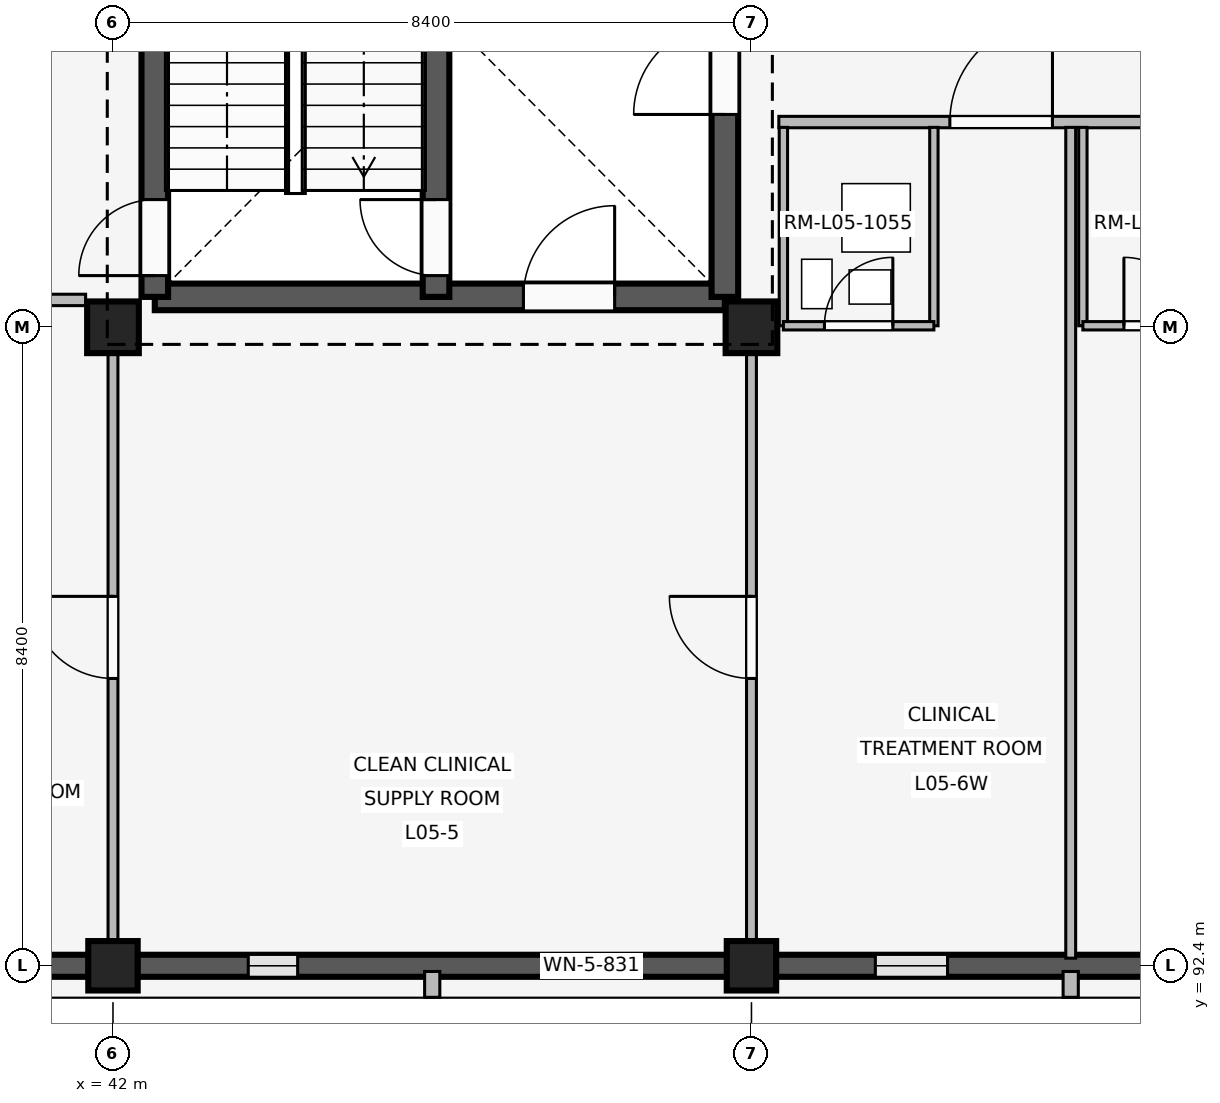
"""IFC4 building model, lengths in metres.
Left out: names, types, materials, properties, quantities, classifications, styles, units other than length and angle.
Written with IfcOpenShell. Run it as: python <this file> out.ifc"""

import sys

from ifc_helpers import new_model, si_unit, direction, frame, frame_2d, origin, origin_2d, place, context, subcontext, project, spatial, rectangle, extrude, element, fill, save


model = new_model("IFC4")
c1 = context("Model", 3, precision=1e-05, world=origin(), true_north=direction((0.0, 1.0)))
c2 = subcontext(c1, "Body", "Model", "MODEL_VIEW")
j1 = project(units=[si_unit("LENGTHUNIT", "METRE"), si_unit("PLANEANGLEUNIT", "RADIAN")], contexts=[c1])
p1 = place(None, origin())
s1 = spatial("IfcSite", under=j1, at=p1, CompositionType="ELEMENT")
p2 = place(p1, origin())
s2 = spatial("IfcBuilding", under=s1, at=p2, CompositionType="ELEMENT")
p3 = place(p2, frame((0.0, 0.0, 20.4)))
s3 = spatial("IfcBuildingStorey", under=s2, at=p3, CompositionType="ELEMENT", Elevation=20.4)
p4 = place(p3, frame((42.0, 92.4, 0.0), z_axis=(0.0, 0.0, 1.0), x_axis=(1.0, 0.0, 0.0)))
e1 = element("IfcColumn", 1, at=p4, inside=s3, PredefinedType="COLUMN", context=c2, shape_type="SweptSolid", body=[
    extrude(rectangle(XDim=0.65, YDim=0.65, at=origin_2d()), origin(), (0.0, 0.0, 1.0), 4.2),
])
p5 = place(p3, frame((42.0, 100.8, 0.0), z_axis=(0.0, 0.0, 1.0), x_axis=(1.0, 0.0, 0.0)))
e2 = element("IfcColumn", 2, at=p5, inside=s3, PredefinedType="COLUMN", context=c2, shape_type="SweptSolid", body=[
    extrude(rectangle(XDim=0.68, YDim=0.68, at=origin_2d()), origin(), (0.0, 0.0, 1.0), 4.2),
])
p6 = place(p3, frame((50.4, 92.4, 0.0), z_axis=(0.0, 0.0, 1.0), x_axis=(1.0, 0.0, 0.0)))
e3 = element("IfcColumn", 3, at=p6, inside=s3, PredefinedType="COLUMN", context=c2, shape_type="SweptSolid", body=[
    extrude(rectangle(XDim=0.65, YDim=0.65, at=origin_2d()), origin(), (0.0, 0.0, 1.0), 4.2),
])
p7 = place(p3, frame((50.4, 100.8, 0.0), z_axis=(0.0, 0.0, 1.0), x_axis=(1.0, 0.0, 0.0)))
e4 = element("IfcColumn", 4, at=p7, inside=s3, PredefinedType="COLUMN", context=c2, shape_type="SweptSolid", body=[
    extrude(rectangle(XDim=0.68, YDim=0.68, at=origin_2d()), origin(), (0.0, 0.0, 1.0), 4.2),
])
p8 = place(p3, frame((41.68, 92.4, 0.0), z_axis=(0.0, 0.0, 1.0), x_axis=(-1.0, 0.0, 0.0)))
e5 = element("IfcWall", 5, at=p8, inside=s3, PredefinedType="SOLIDWALL", context=c2, shape_type="SweptSolid", body=[
    extrude(rectangle(XDim=7.76, YDim=0.29, at=frame_2d((3.88, 0.0))), origin(), (0.0, 0.0, 1.0), 3.34),
])
p9 = place(p8, frame((1.225, 0.0, 0.85)))
e6 = element("IfcOpeningElement", 6, at=p9, cuts=e5, PredefinedType="OPENING", context=c2, shape_type="SweptSolid", body=[
    extrude(rectangle(XDim=0.75, YDim=1.85, at=frame_2d((0.375, 0.925))), frame((0.0, 0.155, 0.0), z_axis=(0.0, -1.0, 0.0), x_axis=(1.0, 0.0, 0.0)), (0.0, 0.0, 1.0), 0.31),
])
p10 = place(p8, frame((5.6, 0.0, 0.85)))
e7 = element("IfcOpeningElement", 7, at=p10, cuts=e5, PredefinedType="OPENING", context=c2, shape_type="SweptSolid", body=[
    extrude(rectangle(XDim=0.75, YDim=1.85, at=frame_2d((0.375, 0.925))), frame((0.0, 0.155, 0.0), z_axis=(0.0, -1.0, 0.0), x_axis=(1.0, 0.0, 0.0)), (0.0, 0.0, 1.0), 0.31),
])
p11 = place(p3, frame((50.08, 92.4, 0.0), z_axis=(0.0, 0.0, 1.0), x_axis=(-1.0, 0.0, 0.0)))
e8 = element("IfcWall", 8, at=p11, inside=s3, PredefinedType="SOLIDWALL", context=c2, shape_type="SweptSolid", body=[
    extrude(rectangle(XDim=7.76, YDim=0.29, at=frame_2d((3.88, 0.0))), origin(), (0.0, 0.0, 1.0), 3.34),
])
p12 = place(p11, frame((1.46, 0.0, 0.85)))
e9 = element("IfcOpeningElement", 9, at=p12, cuts=e8, PredefinedType="OPENING", context=c2, shape_type="SweptSolid", body=[
    extrude(rectangle(XDim=0.65, YDim=1.75, at=frame_2d((0.325, 0.875))), frame((0.0, 0.155, 0.0), z_axis=(0.0, -1.0, 0.0), x_axis=(1.0, 0.0, 0.0)), (0.0, 0.0, 1.0), 0.31),
])
p13 = place(p11, frame((5.65, 0.0, 0.85)))
e10 = element("IfcOpeningElement", 10, at=p13, cuts=e8, PredefinedType="OPENING", context=c2, shape_type="SweptSolid", body=[
    extrude(rectangle(XDim=0.65, YDim=1.75, at=frame_2d((0.325, 0.875))), frame((0.0, 0.155, 0.0), z_axis=(0.0, -1.0, 0.0), x_axis=(1.0, 0.0, 0.0)), (0.0, 0.0, 1.0), 0.31),
])
p14 = place(p3, frame((46.2, 92.325, 0.0), z_axis=(0.0, 0.0, 1.0), x_axis=(0.0, -1.0, 0.0)))
e11 = element("IfcWall", 11, at=p14, inside=s3, PredefinedType="ELEMENTEDWALL", context=c2, shape_type="SweptSolid", body=[
    extrude(rectangle(XDim=0.34, YDim=0.2, at=frame_2d((0.17, 0.0))), origin(), (0.0, 0.0, 1.0), 3.32),
])
p15 = place(p3, frame((58.48, 92.4, 0.0), z_axis=(0.0, 0.0, 1.0), x_axis=(-1.0, 0.0, 0.0)))
e12 = element("IfcWall", 12, at=p15, inside=s3, PredefinedType="SOLIDWALL", context=c2, shape_type="SweptSolid", body=[
    extrude(rectangle(XDim=7.76, YDim=0.29, at=frame_2d((3.88, 0.0))), origin(), (0.0, 0.0, 1.0), 3.34),
])
p16 = place(p15, frame((1.31, 0.0, 0.85)))
e13 = element("IfcOpeningElement", 13, at=p16, cuts=e12, PredefinedType="OPENING", context=c2, shape_type="SweptSolid", body=[
    extrude(rectangle(XDim=0.95, YDim=1.6, at=frame_2d((0.475, 0.8))), frame((0.0, 0.155, 0.0), z_axis=(0.0, -1.0, 0.0), x_axis=(1.0, 0.0, 0.0)), (0.0, 0.0, 1.0), 0.31),
])
p17 = place(p15, frame((5.5, 0.0, 0.85)))
e14 = element("IfcOpeningElement", 14, at=p17, cuts=e12, PredefinedType="OPENING", context=c2, shape_type="SweptSolid", body=[
    extrude(rectangle(XDim=0.95, YDim=1.6, at=frame_2d((0.475, 0.8))), frame((0.0, 0.155, 0.0), z_axis=(0.0, -1.0, 0.0), x_axis=(1.0, 0.0, 0.0)), (0.0, 0.0, 1.0), 0.31),
])
p18 = place(p3, frame((54.6, 92.325, 0.0), z_axis=(0.0, 0.0, 1.0), x_axis=(0.0, -1.0, 0.0)))
e15 = element("IfcWall", 15, at=p18, inside=s3, PredefinedType="ELEMENTEDWALL", context=c2, shape_type="SweptSolid", body=[
    extrude(rectangle(XDim=0.34, YDim=0.2, at=frame_2d((0.17, 0.0))), origin(), (0.0, 0.0, 1.0), 3.32),
])
p19 = place(p3, frame((42.55, 101.2, 0.0), z_axis=(0.0, 0.0, 1.0), x_axis=(1.0, 0.0, 0.0)))
e16 = element("IfcWall", 16, at=p19, inside=s3, PredefinedType="SHEAR", context=c2, shape_type="SweptSolid", body=[
    extrude(rectangle(XDim=7.5, YDim=0.35, at=frame_2d((3.75, 0.0))), origin(), (0.0, 0.0, 1.0), 3.92),
])
p20 = place(p19, frame((4.85, 0.0, 0.0)))
e17 = element("IfcOpeningElement", 17, at=p20, cuts=e16, PredefinedType="OPENING", context=c2, shape_type="SweptSolid", body=[
    extrude(rectangle(XDim=1.2, YDim=2.2, at=frame_2d((0.6, 1.1))), frame((0.0, 0.185, 0.0), z_axis=(0.0, -1.0, 0.0), x_axis=(1.0, 0.0, 0.0)), (0.0, 0.0, 1.0), 0.37),
])
p21 = place(p3, frame((42.55, 101.2, 0.0), z_axis=(0.0, 0.0, 1.0), x_axis=(0.0, 1.0, 0.0)))
e18 = element("IfcWall", 18, at=p21, inside=s3, PredefinedType="SHEAR", context=c2, shape_type="SweptSolid", body=[
    extrude(rectangle(XDim=7.55, YDim=0.35, at=frame_2d((3.775, 0.0))), origin(), (0.0, 0.0, 1.0), 3.92),
])
p22 = place(p21, frame((0.28, 0.0, 0.0)))
e19 = element("IfcOpeningElement", 19, at=p22, cuts=e18, PredefinedType="OPENING", context=c2, shape_type="SweptSolid", body=[
    extrude(rectangle(XDim=1.0, YDim=2.15, at=frame_2d((0.5, 1.075))), frame((0.0, 0.185, 0.0), z_axis=(0.0, -1.0, 0.0), x_axis=(1.0, 0.0, 0.0)), (0.0, 0.0, 1.0), 0.37),
])
p23 = place(p3, frame((50.05, 101.2, 0.0), z_axis=(0.0, 0.0, 1.0), x_axis=(0.0, 1.0, 0.0)))
e20 = element("IfcWall", 20, at=p23, inside=s3, PredefinedType="SHEAR", context=c2, shape_type="SweptSolid", body=[
    extrude(rectangle(XDim=7.55, YDim=0.35, at=frame_2d((3.775, 0.0))), origin(), (0.0, 0.0, 1.0), 3.92),
])
p24 = place(p23, frame((2.4, 0.0, 0.0)))
e21 = element("IfcOpeningElement", 21, at=p24, cuts=e20, PredefinedType="OPENING", context=c2, shape_type="SweptSolid", body=[
    extrude(rectangle(XDim=1.2, YDim=2.2, at=frame_2d((0.6, 1.1))), frame((0.0, 0.185, 0.0), z_axis=(0.0, -1.0, 0.0), x_axis=(1.0, 0.0, 0.0)), (0.0, 0.0, 1.0), 0.37),
])
p25 = place(p3, frame((46.25, 101.2, 0.0), z_axis=(0.0, 0.0, 1.0), x_axis=(0.0, 1.0, 0.0)))
e22 = element("IfcWall", 22, at=p25, inside=s3, PredefinedType="SHEAR", context=c2, shape_type="SweptSolid", body=[
    extrude(rectangle(XDim=7.55, YDim=0.35, at=frame_2d((3.775, 0.0))), origin(), (0.0, 0.0, 1.0), 3.92),
])
p26 = place(p25, frame((0.28, 0.0, 0.0)))
e23 = element("IfcOpeningElement", 23, at=p26, cuts=e22, PredefinedType="OPENING", context=c2, shape_type="SweptSolid", body=[
    extrude(rectangle(XDim=1.0, YDim=2.15, at=frame_2d((0.5, 1.075))), frame((0.0, 0.185, 0.0), z_axis=(0.0, -1.0, 0.0), x_axis=(1.0, 0.0, 0.0)), (0.0, 0.0, 1.0), 0.37),
])
p27 = place(p3, frame((39.46, 101.16, 0.0), z_axis=(0.0, 0.0, 1.0), x_axis=(1.0, 0.0, 0.0)))
e24 = element("IfcWall", 24, at=p27, inside=s3, PredefinedType="PARTITIONING", context=c2, shape_type="SweptSolid", body=[
    extrude(rectangle(XDim=2.18, YDim=0.15, at=frame_2d((1.09, 0.0))), origin(), (0.0, 0.0, 1.0), 3.32),
])
p28 = place(p27, frame((0.5, 0.0, 0.0)))
e25 = element("IfcOpeningElement", 25, at=p28, cuts=e24, PredefinedType="OPENING", context=c2, shape_type="SweptSolid", body=[
    extrude(rectangle(XDim=1.08, YDim=2.15, at=frame_2d((0.54, 1.075))), frame((0.0, 0.085, 0.0), z_axis=(0.0, -1.0, 0.0), x_axis=(1.0, 0.0, 0.0)), (0.0, 0.0, 1.0), 0.17),
])
p29 = place(p3, frame((42.0, 92.54, 0.0), z_axis=(0.0, 0.0, 1.0), x_axis=(0.0, 1.0, 0.0)))
e26 = element("IfcWall", 26, at=p29, inside=s3, PredefinedType="PARTITIONING", context=c2, shape_type="SweptSolid", body=[
    extrude(rectangle(XDim=8.21, YDim=0.13, at=frame_2d((4.105, 0.0))), origin(), (0.0, 0.0, 1.0), 3.32),
])
p30 = place(p29, frame((3.64, 0.0, 0.0)))
e27 = element("IfcOpeningElement", 27, at=p30, cuts=e26, PredefinedType="OPENING", context=c2, shape_type="SweptSolid", body=[
    extrude(rectangle(XDim=1.08, YDim=2.15, at=frame_2d((0.54, 1.075))), frame((0.0, 0.075, 0.0), z_axis=(0.0, -1.0, 0.0), x_axis=(1.0, 0.0, 0.0)), (0.0, 0.0, 1.0), 0.15),
])
p31 = place(p3, frame((50.4, 92.54, 0.0), z_axis=(0.0, 0.0, 1.0), x_axis=(0.0, 1.0, 0.0)))
e28 = element("IfcWall", 28, at=p31, inside=s3, PredefinedType="PARTITIONING", context=c2, shape_type="SweptSolid", body=[
    extrude(rectangle(XDim=8.21, YDim=0.13, at=frame_2d((4.105, 0.0))), origin(), (0.0, 0.0, 1.0), 3.32),
])
p32 = place(p31, frame((3.64, 0.0, 0.0)))
e29 = element("IfcOpeningElement", 29, at=p32, cuts=e28, PredefinedType="OPENING", context=c2, shape_type="SweptSolid", body=[
    extrude(rectangle(XDim=1.08, YDim=2.15, at=frame_2d((0.54, 1.075))), frame((0.0, 0.075, 0.0), z_axis=(0.0, -1.0, 0.0), x_axis=(1.0, 0.0, 0.0)), (0.0, 0.0, 1.0), 0.15),
])
p33 = place(p3, frame((50.76, 103.5, 0.0), z_axis=(0.0, 0.0, 1.0), x_axis=(1.0, 0.0, 0.0)))
e30 = element("IfcWall", 30, at=p33, inside=s3, PredefinedType="PARTITIONING", context=c2, shape_type="SweptSolid", body=[
    extrude(rectangle(XDim=7.96, YDim=0.15, at=frame_2d((3.98, 0.0))), origin(), (0.0, 0.0, 1.0), 3.32),
])
p34 = place(p33, frame((2.25, 0.0, 0.0)))
e31 = element("IfcOpeningElement", 31, at=p34, cuts=e30, PredefinedType="OPENING", context=c2, shape_type="SweptSolid", body=[
    extrude(rectangle(XDim=1.35, YDim=2.25, at=frame_2d((0.675, 1.125))), frame((0.0, 0.085, 0.0), z_axis=(0.0, -1.0, 0.0), x_axis=(1.0, 0.0, 0.0)), (0.0, 0.0, 1.0), 0.17),
])
p35 = place(p33, frame((5.95, 0.0, 0.0)))
e32 = element("IfcOpeningElement", 32, at=p35, cuts=e30, PredefinedType="OPENING", context=c2, shape_type="SweptSolid", body=[
    extrude(rectangle(XDim=1.35, YDim=2.25, at=frame_2d((0.675, 1.125))), frame((0.0, 0.085, 0.0), z_axis=(0.0, -1.0, 0.0), x_axis=(1.0, 0.0, 0.0)), (0.0, 0.0, 1.0), 0.17),
])
p36 = place(p3, frame((54.6, 92.5, 0.0), z_axis=(0.0, 0.0, 1.0), x_axis=(0.0, 1.0, 0.0)))
e33 = element("IfcWall", 33, at=p36, inside=s3, PredefinedType="PARTITIONING", context=c2, shape_type="SweptSolid", body=[
    extrude(rectangle(XDim=10.93, YDim=0.13, at=frame_2d((5.465, 0.0))), origin(), (0.0, 0.0, 1.0), 3.32),
])
for number, where, z_axis, x_axis in (
    (34, (50.82, 100.82, 0.0), (0.0, 0.0, 1.0), (0.0, 1.0, 0.0)),
    (35, (52.8, 100.82, 0.0), (0.0, 0.0, 1.0), (0.0, 1.0, 0.0)),
):
    element("IfcWall", number, at=place(p3, frame(where, z_axis=z_axis, x_axis=x_axis)), inside=s3, PredefinedType="PARTITIONING", context=c2, shape_type="SweptSolid", body=[
        extrude(rectangle(XDim=2.61, YDim=0.11, at=frame_2d((1.305, 0.0))), origin(), (0.0, 0.0, 1.0), 3.32),
    ])
p37 = place(p3, frame((50.82, 100.82, 0.0), z_axis=(0.0, 0.0, 1.0), x_axis=(1.0, 0.0, 0.0)))
e36 = element("IfcWall", 36, at=p37, inside=s3, PredefinedType="PARTITIONING", context=c2, shape_type="SweptSolid", body=[
    extrude(rectangle(XDim=1.98, YDim=0.11, at=frame_2d((0.99, 0.0))), origin(), (0.0, 0.0, 1.0), 3.32),
])
p38 = place(p37, frame((0.54, 0.0, 0.0)))
e37 = element("IfcOpeningElement", 37, at=p38, cuts=e36, PredefinedType="OPENING", context=c2, shape_type="SweptSolid", body=[
    extrude(rectangle(XDim=0.9, YDim=2.1, at=frame_2d((0.45, 1.05))), frame((0.0, 0.065, 0.0), z_axis=(0.0, -1.0, 0.0), x_axis=(1.0, 0.0, 0.0)), (0.0, 0.0, 1.0), 0.13),
])
p39 = place(p3, frame((54.76, 100.82, 0.0), z_axis=(0.0, 0.0, 1.0), x_axis=(0.0, 1.0, 0.0)))
e38 = element("IfcWall", 38, at=p39, inside=s3, PredefinedType="PARTITIONING", context=c2, shape_type="SweptSolid", body=[
    extrude(rectangle(XDim=2.61, YDim=0.11, at=frame_2d((1.305, 0.0))), origin(), (0.0, 0.0, 1.0), 3.32),
])
p40 = place(p3, frame((54.76, 100.82, 0.0), z_axis=(0.0, 0.0, 1.0), x_axis=(1.0, 0.0, 0.0)))
e39 = element("IfcWall", 39, at=p40, inside=s3, PredefinedType="PARTITIONING", context=c2, shape_type="SweptSolid", body=[
    extrude(rectangle(XDim=1.98, YDim=0.11, at=frame_2d((0.99, 0.0))), origin(), (0.0, 0.0, 1.0), 3.32),
])
p41 = place(p40, frame((0.54, 0.0, 0.0)))
e40 = element("IfcOpeningElement", 40, at=p41, cuts=e39, PredefinedType="OPENING", context=c2, shape_type="SweptSolid", body=[
    extrude(rectangle(XDim=0.9, YDim=2.1, at=frame_2d((0.45, 1.05))), frame((0.0, 0.065, 0.0), z_axis=(0.0, -1.0, 0.0), x_axis=(1.0, 0.0, 0.0)), (0.0, 0.0, 1.0), 0.13),
])
p42 = place(p12, origin())
e41 = element("IfcWindow", 41, at=p42, inside=s3, PartitioningType="SINGLE_PANEL", PredefinedType="WINDOW", context=c2, shape_type="SweptSolid", body=[
    extrude(rectangle(XDim=0.65, YDim=1.75, at=frame_2d((0.325, 0.875))), frame((0.0, 0.03, 0.0), z_axis=(0.0, -1.0, 0.0), x_axis=(1.0, 0.0, 0.0)), (0.0, 0.0, 1.0), 0.06),
])
fill(e9, e41)
p43 = place(p13, origin())
e42 = element("IfcWindow", 42, at=p43, inside=s3, PartitioningType="SINGLE_PANEL", PredefinedType="WINDOW", context=c2, shape_type="SweptSolid", body=[
    extrude(rectangle(XDim=0.65, YDim=1.75, at=frame_2d((0.325, 0.875))), frame((0.0, 0.03, 0.0), z_axis=(0.0, -1.0, 0.0), x_axis=(1.0, 0.0, 0.0)), (0.0, 0.0, 1.0), 0.06),
])
fill(e10, e42)
p44 = place(p17, origin())
e43 = element("IfcWindow", 43, at=p44, inside=s3, PartitioningType="SINGLE_PANEL", PredefinedType="WINDOW", context=c2, shape_type="SweptSolid", body=[
    extrude(rectangle(XDim=0.95, YDim=1.6, at=frame_2d((0.475, 0.8))), frame((0.0, 0.03, 0.0), z_axis=(0.0, -1.0, 0.0), x_axis=(1.0, 0.0, 0.0)), (0.0, 0.0, 1.0), 0.06),
])
fill(e14, e43)
p45 = place(p24, origin())
e44 = element("IfcDoor", 44, at=p45, inside=s3, OperationType="SINGLE_SWING_LEFT", PredefinedType="DOOR", context=c2, shape_type="SweptSolid", body=[
    extrude(rectangle(XDim=1.2, YDim=2.2, at=frame_2d((0.6, 1.1))), frame((0.0, 0.025, 0.0), z_axis=(0.0, -1.0, 0.0), x_axis=(1.0, 0.0, 0.0)), (0.0, 0.0, 1.0), 0.05),
])
fill(e21, e44)
p46 = place(p20, origin())
e45 = element("IfcDoor", 45, at=p46, inside=s3, OperationType="SINGLE_SWING_RIGHT", PredefinedType="DOOR", context=c2, shape_type="SweptSolid", body=[
    extrude(rectangle(XDim=1.2, YDim=2.2, at=frame_2d((0.6, 1.1))), frame((0.0, 0.025, 0.0), z_axis=(0.0, -1.0, 0.0), x_axis=(1.0, 0.0, 0.0)), (0.0, 0.0, 1.0), 0.05),
])
fill(e17, e45)
p47 = place(p22, origin())
e46 = element("IfcDoor", 46, at=p47, inside=s3, OperationType="SINGLE_SWING_LEFT", PredefinedType="DOOR", context=c2, shape_type="SweptSolid", body=[
    extrude(rectangle(XDim=1.0, YDim=2.15, at=frame_2d((0.5, 1.075))), frame((0.0, 0.025, 0.0), z_axis=(0.0, -1.0, 0.0), x_axis=(1.0, 0.0, 0.0)), (0.0, 0.0, 1.0), 0.05),
])
fill(e19, e46)
p48 = place(p26, origin())
e47 = element("IfcDoor", 47, at=p48, inside=s3, OperationType="SINGLE_SWING_RIGHT", PredefinedType="DOOR", context=c2, shape_type="SweptSolid", body=[
    extrude(rectangle(XDim=1.0, YDim=2.15, at=frame_2d((0.5, 1.075))), frame((0.0, 0.025, 0.0), z_axis=(0.0, -1.0, 0.0), x_axis=(1.0, 0.0, 0.0)), (0.0, 0.0, 1.0), 0.05),
])
fill(e23, e47)
p49 = place(p30, origin())
e48 = element("IfcDoor", 48, at=p49, inside=s3, OperationType="SINGLE_SWING_RIGHT", PredefinedType="DOOR", context=c2, shape_type="SweptSolid", body=[
    extrude(rectangle(XDim=1.08, YDim=2.15, at=frame_2d((0.54, 1.075))), frame((0.0, 0.025, 0.0), z_axis=(0.0, -1.0, 0.0), x_axis=(1.0, 0.0, 0.0)), (0.0, 0.0, 1.0), 0.05),
])
fill(e27, e48)
p50 = place(p32, origin())
e49 = element("IfcDoor", 49, at=p50, inside=s3, OperationType="SINGLE_SWING_RIGHT", PredefinedType="DOOR", context=c2, shape_type="SweptSolid", body=[
    extrude(rectangle(XDim=1.08, YDim=2.15, at=frame_2d((0.54, 1.075))), frame((0.0, 0.025, 0.0), z_axis=(0.0, -1.0, 0.0), x_axis=(1.0, 0.0, 0.0)), (0.0, 0.0, 1.0), 0.05),
])
fill(e29, e49)
p51 = place(p34, origin())
e50 = element("IfcDoor", 50, at=p51, inside=s3, OperationType="SINGLE_SWING_RIGHT", PredefinedType="DOOR", context=c2, shape_type="SweptSolid", body=[
    extrude(rectangle(XDim=1.35, YDim=2.25, at=frame_2d((0.675, 1.125))), frame((0.0, 0.025, 0.0), z_axis=(0.0, -1.0, 0.0), x_axis=(1.0, 0.0, 0.0)), (0.0, 0.0, 1.0), 0.05),
])
fill(e31, e50)
p52 = place(p38, origin())
e51 = element("IfcDoor", 51, at=p52, inside=s3, OperationType="SINGLE_SWING_RIGHT", PredefinedType="DOOR", context=c2, shape_type="SweptSolid", body=[
    extrude(rectangle(XDim=0.9, YDim=2.1, at=frame_2d((0.45, 1.05))), frame((0.0, 0.025, 0.0), z_axis=(0.0, -1.0, 0.0), x_axis=(1.0, 0.0, 0.0)), (0.0, 0.0, 1.0), 0.05),
])
fill(e37, e51)
p53 = place(p41, origin())
e52 = element("IfcDoor", 52, at=p53, inside=s3, OperationType="SINGLE_SWING_LEFT", PredefinedType="DOOR", context=c2, shape_type="SweptSolid", body=[
    extrude(rectangle(XDim=0.9, YDim=2.1, at=frame_2d((0.45, 1.05))), frame((0.0, 0.025, 0.0), z_axis=(0.0, -1.0, 0.0), x_axis=(1.0, 0.0, 0.0)), (0.0, 0.0, 1.0), 0.05),
])
fill(e40, e52)
save(model, sys.argv[1])
